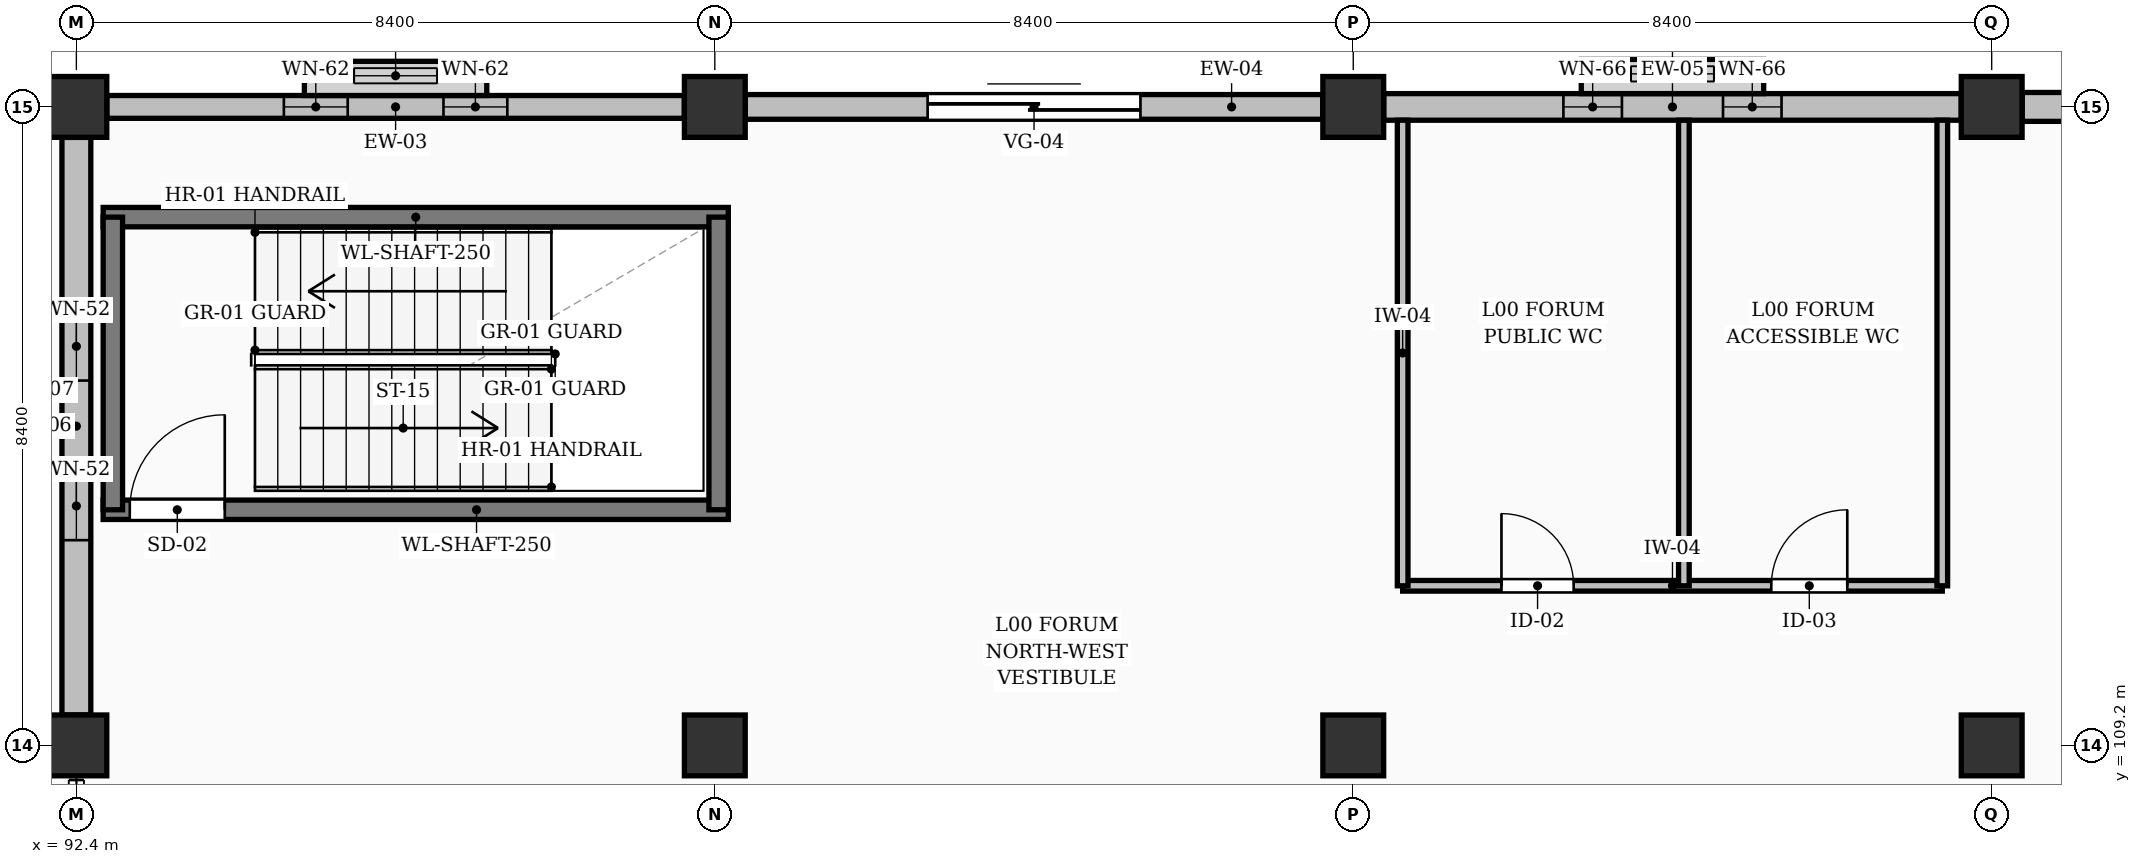
"""IFC4 building model, lengths in metres.
Left out: names, types, materials, properties, quantities, classifications, styles, units other than length and angle.
Written with IfcOpenShell. Run it as: python <this file> out.ifc"""

import sys

from ifc_helpers import new_model, si_unit, direction, frame, frame_2d, origin, origin_2d, place, context, subcontext, project, spatial, rectangle, extrude, element, fill, save


model = new_model("IFC4")
c1 = context("Model", 3, precision=1e-05, world=origin(), true_north=direction((0.0, 1.0)))
c2 = subcontext(c1, "Body", "Model", "MODEL_VIEW")
j1 = project(units=[si_unit("LENGTHUNIT", "METRE"), si_unit("PLANEANGLEUNIT", "RADIAN")], contexts=[c1])
p1 = place(None, origin())
s1 = spatial("IfcSite", under=j1, at=p1, CompositionType="ELEMENT")
p2 = place(p1, origin())
s2 = spatial("IfcBuilding", under=s1, at=p2, CompositionType="ELEMENT")
p3 = place(p2, origin())
s3 = spatial("IfcBuildingStorey", under=s2, at=p3, CompositionType="ELEMENT", Elevation=0.0)
for number, where, z_axis, x_axis in (
    (1, (92.4, 109.2, 0.0), (0.0, 0.0, 1.0), (1.0, 0.0, 0.0)),
    (2, (92.4, 117.6, 0.0), (0.0, 0.0, 1.0), (1.0, 0.0, 0.0)),
    (3, (100.8, 109.2, 0.0), (0.0, 0.0, 1.0), (1.0, 0.0, 0.0)),
    (4, (100.8, 117.6, 0.0), (0.0, 0.0, 1.0), (1.0, 0.0, 0.0)),
    (5, (109.2, 109.2, 0.0), (0.0, 0.0, 1.0), (1.0, 0.0, 0.0)),
    (6, (109.2, 117.6, 0.0), (0.0, 0.0, 1.0), (1.0, 0.0, 0.0)),
    (7, (117.6, 109.2, 0.0), (0.0, 0.0, 1.0), (1.0, 0.0, 0.0)),
    (8, (117.6, 117.6, 0.0), (0.0, 0.0, 1.0), (1.0, 0.0, 0.0)),
):
    element("IfcColumn", number, at=place(p3, frame(where, z_axis=z_axis, x_axis=x_axis)), inside=s3, PredefinedType="COLUMN", context=c2, shape_type="SweptSolid", body=[
        extrude(rectangle(XDim=0.8, YDim=0.8, at=origin_2d()), origin(), (0.0, 0.0, 1.0), 3.92),
    ])
p4 = place(p3, frame((92.801, 117.6, 0.0), z_axis=(0.0, 0.0, 1.0), x_axis=(1.0, 0.0, 0.0)))
e9 = element("IfcWall", 9, at=p4, inside=s3, PredefinedType="SOLIDWALL", context=c2, shape_type="SweptSolid", body=[
    extrude(rectangle(XDim=7.598, YDim=0.3, at=frame_2d((3.799, 0.0))), origin(), (0.0, 0.0, 1.0), 2.825),
])
p5 = place(p4, frame((2.329, 0.0, 0.3)))
e10 = element("IfcOpeningElement", 10, at=p5, cuts=e9, PredefinedType="OPENING", context=c2, shape_type="SweptSolid", body=[
    extrude(rectangle(XDim=0.84, YDim=1.75, at=frame_2d((0.42, 0.875))), frame((0.0, 0.16, 0.0), z_axis=(0.0, -1.0, 0.0), x_axis=(1.0, 0.0, 0.0)), (0.0, 0.0, 1.0), 0.32),
])
p6 = place(p4, frame((4.429, 0.0, 0.3)))
e11 = element("IfcOpeningElement", 11, at=p6, cuts=e9, PredefinedType="OPENING", context=c2, shape_type="SweptSolid", body=[
    extrude(rectangle(XDim=0.84, YDim=1.75, at=frame_2d((0.42, 0.875))), frame((0.0, 0.16, 0.0), z_axis=(0.0, -1.0, 0.0), x_axis=(1.0, 0.0, 0.0)), (0.0, 0.0, 1.0), 0.32),
])
p7 = place(p3, frame((101.201, 117.6, 0.0), z_axis=(0.0, 0.0, 1.0), x_axis=(1.0, 0.0, 0.0)))
e12 = element("IfcWall", 12, at=p7, inside=s3, PredefinedType="SOLIDWALL", context=c2, shape_type="SweptSolid", body=[
    extrude(rectangle(XDim=7.598, YDim=0.325, at=frame_2d((3.799, 0.0))), origin(), (0.0, 0.0, 1.0), 2.825),
])
p8 = place(p7, frame((2.399, 0.0, 0.0)))
e13 = element("IfcOpeningElement", 13, at=p8, cuts=e12, PredefinedType="OPENING", context=c2, shape_type="SweptSolid", body=[
    extrude(rectangle(XDim=2.8, YDim=2.3, at=frame_2d((1.4, 1.15))), frame((0.0, 0.172, 0.0), z_axis=(0.0, -1.0, 0.0), x_axis=(1.0, 0.0, 0.0)), (0.0, 0.0, 1.0), 0.345),
])
p9 = place(p3, frame((109.601, 117.6, 0.0), z_axis=(0.0, 0.0, 1.0), x_axis=(1.0, 0.0, 0.0)))
e14 = element("IfcWall", 14, at=p9, inside=s3, PredefinedType="SOLIDWALL", context=c2, shape_type="SweptSolid", body=[
    extrude(rectangle(XDim=7.598, YDim=0.35, at=frame_2d((3.799, 0.0))), origin(), (0.0, 0.0, 1.0), 2.825),
])
p10 = place(p9, frame((2.364, 0.0, 0.3)))
e15 = element("IfcOpeningElement", 15, at=p10, cuts=e14, PredefinedType="OPENING", context=c2, shape_type="SweptSolid", body=[
    extrude(rectangle(XDim=0.77, YDim=1.9, at=frame_2d((0.385, 0.95))), frame((0.0, 0.185, 0.0), z_axis=(0.0, -1.0, 0.0), x_axis=(1.0, 0.0, 0.0)), (0.0, 0.0, 1.0), 0.37),
])
p11 = place(p9, frame((4.464, 0.0, 0.3)))
e16 = element("IfcOpeningElement", 16, at=p11, cuts=e14, PredefinedType="OPENING", context=c2, shape_type="SweptSolid", body=[
    extrude(rectangle(XDim=0.77, YDim=1.9, at=frame_2d((0.385, 0.95))), frame((0.0, 0.185, 0.0), z_axis=(0.0, -1.0, 0.0), x_axis=(1.0, 0.0, 0.0)), (0.0, 0.0, 1.0), 0.37),
])
p12 = place(p3, frame((118.001, 117.6, 0.0), z_axis=(0.0, 0.0, 1.0), x_axis=(1.0, 0.0, 0.0)))
e17 = element("IfcWall", 17, at=p12, inside=s3, PredefinedType="SOLIDWALL", context=c2, shape_type="SweptSolid", body=[
    extrude(rectangle(XDim=7.598, YDim=0.38, at=frame_2d((3.799, 0.0))), origin(), (0.0, 0.0, 1.0), 2.825),
])
p13 = place(p12, frame((1.249, 0.0, 0.0)))
e18 = element("IfcOpeningElement", 18, at=p13, cuts=e17, PredefinedType="OPENING", context=c2, shape_type="SweptSolid", body=[
    extrude(rectangle(XDim=1.9, YDim=2.2, at=frame_2d((0.95, 1.1))), frame((0.0, 0.2, 0.0), z_axis=(0.0, -1.0, 0.0), x_axis=(1.0, 0.0, 0.0)), (0.0, 0.0, 1.0), 0.4),
])
p14 = place(p12, frame((4.398, 0.0, 0.0)))
e19 = element("IfcOpeningElement", 19, at=p14, cuts=e17, PredefinedType="OPENING", context=c2, shape_type="SweptSolid", body=[
    extrude(rectangle(XDim=1.65, YDim=2.2, at=frame_2d((0.825, 1.1))), frame((0.0, 0.2, 0.0), z_axis=(0.0, -1.0, 0.0), x_axis=(1.0, 0.0, 0.0)), (0.0, 0.0, 1.0), 0.4),
])
p15 = place(p3, frame((92.4, 109.601, 0.0), z_axis=(0.0, 0.0, 1.0), x_axis=(0.0, 1.0, 0.0)))
e20 = element("IfcWall", 20, at=p15, inside=s3, PredefinedType="SOLIDWALL", context=c2, shape_type="SweptSolid", body=[
    extrude(rectangle(XDim=7.598, YDim=0.38, at=frame_2d((3.799, 0.0))), origin(), (0.0, 0.0, 1.0), 2.975),
])
p16 = place(p15, frame((2.299, 0.0, 0.3)))
e21 = element("IfcOpeningElement", 21, at=p16, cuts=e20, PredefinedType="OPENING", context=c2, shape_type="SweptSolid", body=[
    extrude(rectangle(XDim=0.9, YDim=1.95, at=frame_2d((0.45, 0.975))), frame((0.0, 0.2, 0.0), z_axis=(0.0, -1.0, 0.0), x_axis=(1.0, 0.0, 0.0)), (0.0, 0.0, 1.0), 0.4),
])
p17 = place(p15, frame((4.399, 0.0, 0.3)))
e22 = element("IfcOpeningElement", 22, at=p17, cuts=e20, PredefinedType="OPENING", context=c2, shape_type="SweptSolid", body=[
    extrude(rectangle(XDim=0.9, YDim=1.95, at=frame_2d((0.45, 0.975))), frame((0.0, 0.2, 0.0), z_axis=(0.0, -1.0, 0.0), x_axis=(1.0, 0.0, 0.0)), (0.0, 0.0, 1.0), 0.4),
])
p18 = place(p3, frame((92.752, 112.3, 0.0), z_axis=(0.0, 0.0, 1.0), x_axis=(1.0, 0.0, 0.0)))
e23 = element("IfcWall", 23, at=p18, inside=s3, PredefinedType="SOLIDWALL", context=c2, shape_type="SweptSolid", body=[
    extrude(rectangle(XDim=8.225, YDim=0.255, at=frame_2d((4.113, 0.0))), origin(), (0.0, 0.0, 1.0), 3.64),
])
p19 = place(p18, frame((0.35, 0.0, 0.0)))
e24 = element("IfcOpeningElement", 24, at=p19, cuts=e23, PredefinedType="OPENING", context=c2, shape_type="SweptSolid", body=[
    extrude(rectangle(XDim=1.25, YDim=2.2, at=frame_2d((0.625, 1.1))), frame((0.0, 0.137, 0.0), z_axis=(0.0, -1.0, 0.0), x_axis=(1.0, 0.0, 0.0)), (0.0, 0.0, 1.0), 0.275),
])
p20 = place(p3, frame((92.752, 116.15, 0.0), z_axis=(0.0, 0.0, 1.0), x_axis=(1.0, 0.0, 0.0)))
e25 = element("IfcWall", 25, at=p20, inside=s3, PredefinedType="SOLIDWALL", context=c2, shape_type="SweptSolid", body=[
    extrude(rectangle(XDim=8.225, YDim=0.255, at=frame_2d((4.113, 0.0))), origin(), (0.0, 0.0, 1.0), 3.64),
])
for number, where, z_axis, x_axis in (
    (26, (92.88, 112.3, 0.0), (0.0, 0.0, 1.0), (0.0, 1.0, 0.0)),
    (27, (100.85, 112.3, 0.0), (0.0, 0.0, 1.0), (0.0, 1.0, 0.0)),
):
    element("IfcWall", number, at=place(p3, frame(where, z_axis=z_axis, x_axis=x_axis)), inside=s3, PredefinedType="SOLIDWALL", context=c2, shape_type="SweptSolid", body=[
        extrude(rectangle(XDim=3.85, YDim=0.255, at=frame_2d((1.925, 0.0))), origin(), (0.0, 0.0, 1.0), 3.64),
    ])
p21 = place(p3, frame((109.85, 111.3, 0.0), z_axis=(0.0, 0.0, 1.0), x_axis=(1.0, 0.0, 0.0)))
e28 = element("IfcWall", 28, at=p21, inside=s3, PredefinedType="PARTITIONING", context=c2, shape_type="SweptSolid", body=[
    extrude(rectangle(XDim=7.1, YDim=0.14, at=frame_2d((3.55, 0.0))), origin(), (0.0, 0.0, 1.0), 3.64),
])
p22 = place(p21, frame((1.3, 0.0, 0.0)))
e29 = element("IfcOpeningElement", 29, at=p22, cuts=e28, PredefinedType="OPENING", context=c2, shape_type="SweptSolid", body=[
    extrude(rectangle(XDim=0.95, YDim=2.1, at=frame_2d((0.475, 1.05))), frame((0.0, 0.08, 0.0), z_axis=(0.0, -1.0, 0.0), x_axis=(1.0, 0.0, 0.0)), (0.0, 0.0, 1.0), 0.16),
])
p23 = place(p21, frame((4.85, 0.0, 0.0)))
e30 = element("IfcOpeningElement", 30, at=p23, cuts=e28, PredefinedType="OPENING", context=c2, shape_type="SweptSolid", body=[
    extrude(rectangle(XDim=1.0, YDim=2.1, at=frame_2d((0.5, 1.05))), frame((0.0, 0.08, 0.0), z_axis=(0.0, -1.0, 0.0), x_axis=(1.0, 0.0, 0.0)), (0.0, 0.0, 1.0), 0.16),
])
for number, where, z_axis, x_axis in (
    (31, (109.85, 111.3, 0.0), (0.0, 0.0, 1.0), (0.0, 1.0, 0.0)),
    (32, (113.55, 111.3, 0.0), (0.0, 0.0, 1.0), (0.0, 1.0, 0.0)),
    (33, (116.95, 111.3, 0.0), (0.0, 0.0, 1.0), (0.0, 1.0, 0.0)),
):
    element("IfcWall", number, at=place(p3, frame(where, z_axis=z_axis, x_axis=x_axis)), inside=s3, PredefinedType="PARTITIONING", context=c2, shape_type="SweptSolid", body=[
        extrude(rectangle(XDim=6.125, YDim=0.14, at=frame_2d((3.062, 0.0))), origin(), (0.0, 0.0, 1.0), 3.64),
    ])
p24 = place(p5, origin())
e34 = element("IfcWindow", 34, at=p24, inside=s3, PartitioningType="SINGLE_PANEL", PredefinedType="WINDOW", context=c2, shape_type="SweptSolid", body=[
    extrude(rectangle(XDim=0.84, YDim=1.75, at=frame_2d((0.42, 0.875))), frame((0.0, 0.03, 0.0), z_axis=(0.0, -1.0, 0.0), x_axis=(1.0, 0.0, 0.0)), (0.0, 0.0, 1.0), 0.06),
])
fill(e10, e34)
p25 = place(p6, origin())
e35 = element("IfcWindow", 35, at=p25, inside=s3, PartitioningType="SINGLE_PANEL", PredefinedType="WINDOW", context=c2, shape_type="SweptSolid", body=[
    extrude(rectangle(XDim=0.84, YDim=1.75, at=frame_2d((0.42, 0.875))), frame((0.0, 0.03, 0.0), z_axis=(0.0, -1.0, 0.0), x_axis=(1.0, 0.0, 0.0)), (0.0, 0.0, 1.0), 0.06),
])
fill(e11, e35)
p26 = place(p8, origin())
e36 = element("IfcDoor", 36, at=p26, inside=s3, OperationType="DOUBLE_DOOR_SINGLE_SWING", PredefinedType="GATE", context=c2, shape_type="SweptSolid", body=[
    extrude(rectangle(XDim=2.8, YDim=2.3, at=frame_2d((1.4, 1.15))), frame((0.0, 0.025, 0.0), z_axis=(0.0, -1.0, 0.0), x_axis=(1.0, 0.0, 0.0)), (0.0, 0.0, 1.0), 0.05),
])
fill(e13, e36)
p27 = place(p10, origin())
e37 = element("IfcWindow", 37, at=p27, inside=s3, PartitioningType="SINGLE_PANEL", PredefinedType="WINDOW", context=c2, shape_type="SweptSolid", body=[
    extrude(rectangle(XDim=0.77, YDim=1.9, at=frame_2d((0.385, 0.95))), frame((0.0, 0.03, 0.0), z_axis=(0.0, -1.0, 0.0), x_axis=(1.0, 0.0, 0.0)), (0.0, 0.0, 1.0), 0.06),
])
fill(e15, e37)
p28 = place(p11, origin())
e38 = element("IfcWindow", 38, at=p28, inside=s3, PartitioningType="SINGLE_PANEL", PredefinedType="WINDOW", context=c2, shape_type="SweptSolid", body=[
    extrude(rectangle(XDim=0.77, YDim=1.9, at=frame_2d((0.385, 0.95))), frame((0.0, 0.03, 0.0), z_axis=(0.0, -1.0, 0.0), x_axis=(1.0, 0.0, 0.0)), (0.0, 0.0, 1.0), 0.06),
])
fill(e16, e38)
p29 = place(p16, origin())
e39 = element("IfcWindow", 39, at=p29, inside=s3, PartitioningType="SINGLE_PANEL", PredefinedType="WINDOW", context=c2, shape_type="SweptSolid", body=[
    extrude(rectangle(XDim=0.9, YDim=1.95, at=frame_2d((0.45, 0.975))), frame((0.0, 0.03, 0.0), z_axis=(0.0, -1.0, 0.0), x_axis=(1.0, 0.0, 0.0)), (0.0, 0.0, 1.0), 0.06),
])
fill(e21, e39)
p30 = place(p17, origin())
e40 = element("IfcWindow", 40, at=p30, inside=s3, PartitioningType="SINGLE_PANEL", PredefinedType="WINDOW", context=c2, shape_type="SweptSolid", body=[
    extrude(rectangle(XDim=0.9, YDim=1.95, at=frame_2d((0.45, 0.975))), frame((0.0, 0.03, 0.0), z_axis=(0.0, -1.0, 0.0), x_axis=(1.0, 0.0, 0.0)), (0.0, 0.0, 1.0), 0.06),
])
fill(e22, e40)
p31 = place(p19, origin())
e41 = element("IfcDoor", 41, at=p31, inside=s3, OperationType="SINGLE_SWING_RIGHT", PredefinedType="DOOR", context=c2, shape_type="SweptSolid", body=[
    extrude(rectangle(XDim=1.25, YDim=2.2, at=frame_2d((0.625, 1.1))), frame((0.0, 0.025, 0.0), z_axis=(0.0, -1.0, 0.0), x_axis=(1.0, 0.0, 0.0)), (0.0, 0.0, 1.0), 0.05),
])
fill(e24, e41)
p32 = place(p22, origin())
e42 = element("IfcDoor", 42, at=p32, inside=s3, OperationType="SINGLE_SWING_LEFT", PredefinedType="DOOR", context=c2, shape_type="SweptSolid", body=[
    extrude(rectangle(XDim=0.95, YDim=2.1, at=frame_2d((0.475, 1.05))), frame((0.0, 0.025, 0.0), z_axis=(0.0, -1.0, 0.0), x_axis=(1.0, 0.0, 0.0)), (0.0, 0.0, 1.0), 0.05),
])
fill(e29, e42)
p33 = place(p23, origin())
e43 = element("IfcDoor", 43, at=p33, inside=s3, OperationType="SINGLE_SWING_RIGHT", PredefinedType="DOOR", context=c2, shape_type="SweptSolid", body=[
    extrude(rectangle(XDim=1.0, YDim=2.1, at=frame_2d((0.5, 1.05))), frame((0.0, 0.025, 0.0), z_axis=(0.0, -1.0, 0.0), x_axis=(1.0, 0.0, 0.0)), (0.0, 0.0, 1.0), 0.05),
])
fill(e30, e43)
save(model, sys.argv[1])
